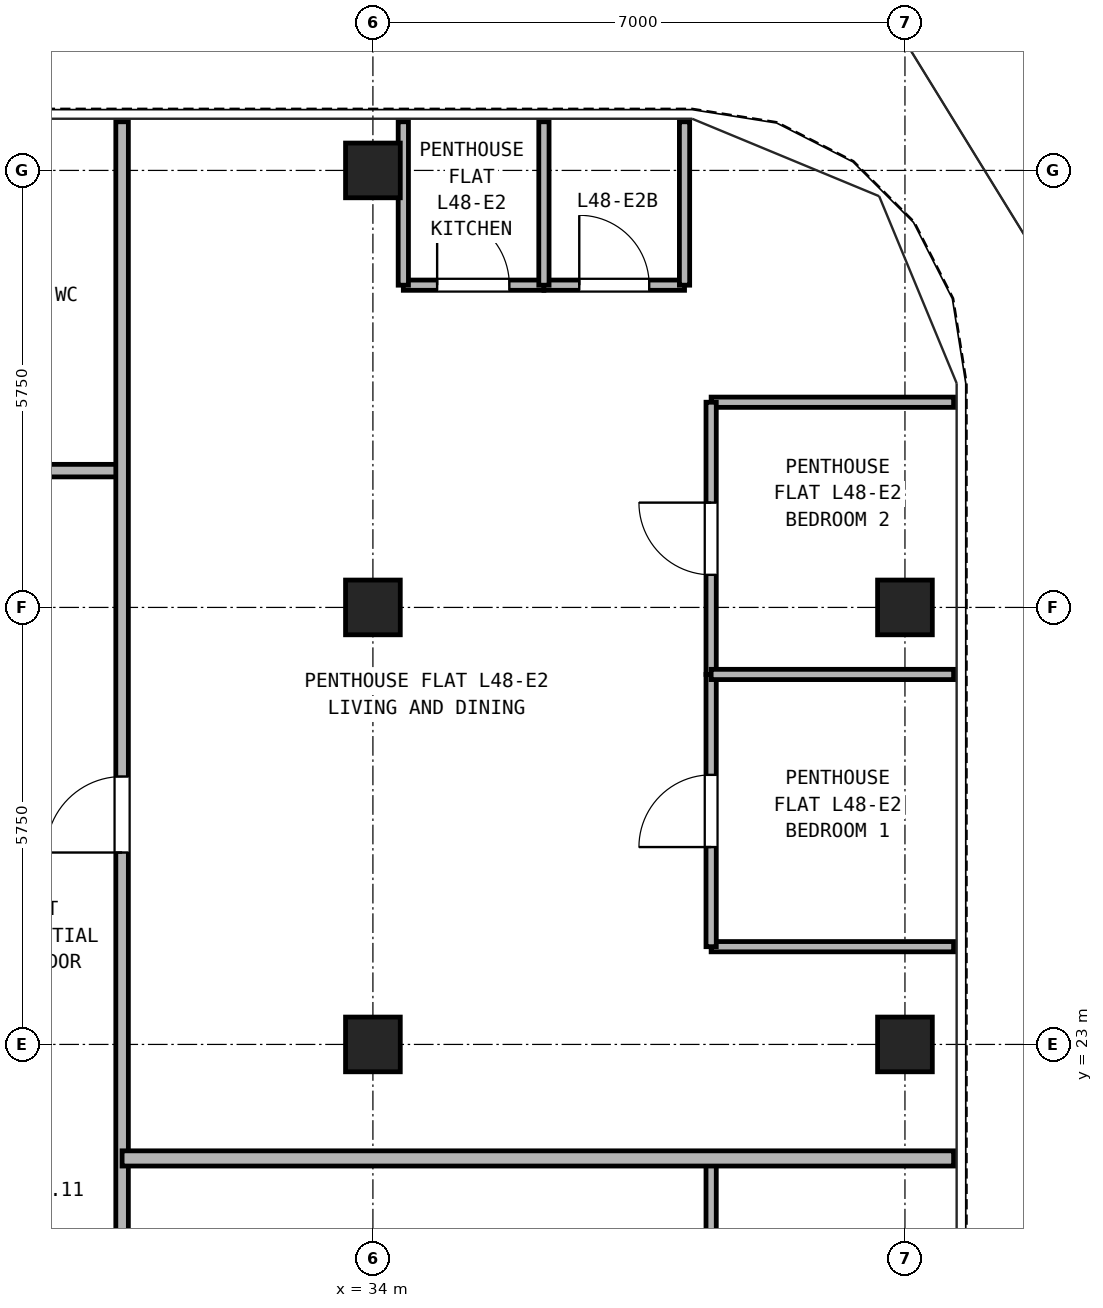
"""IFC4 building model, lengths in metres.
Left out: names, types, materials, properties, quantities, classifications, styles, units other than length and angle.
Written with IfcOpenShell. Run it as: python <this file> out.ifc"""

import sys

from ifc_helpers import new_model, si_unit, direction, frame, frame_2d, origin, origin_2d, place, context, subcontext, project, spatial, rectangle, hollow_rectangle, extrude, source, transform, mapped, element, fill, save


model = new_model("IFC4")
c1 = context("Model", 3, precision=1e-05, world=origin(), true_north=direction((0.0, 1.0)))
c2 = subcontext(c1, "Body", "Model", "MODEL_VIEW")
j1 = project(units=[si_unit("LENGTHUNIT", "METRE"), si_unit("PLANEANGLEUNIT", "RADIAN")], contexts=[c1])
p1 = place(None, origin())
s1 = spatial("IfcSite", under=j1, at=p1, CompositionType="ELEMENT")
p2 = place(p1, origin())
s2 = spatial("IfcBuilding", under=s1, at=p2, CompositionType="ELEMENT")
p3 = place(p2, frame((0.0, 0.0, 172.1)))
s3 = spatial("IfcBuildingStorey", under=s2, at=p3, CompositionType="ELEMENT", Elevation=172.1)
m1 = source(origin(), c2, "Body", "SweptSolid", [
    extrude(hollow_rectangle(XDim=0.72, YDim=0.72, WallThickness=0.04, at=origin_2d()), origin(), (0.0, 0.0, 1.0), 2.95),
])
for number, where, z_axis, x_axis in (
    (1, (34.0, 34.5, 0.0), (0.0, 0.0, 1.0), (1.0, 0.0, 0.0)),
    (2, (41.0, 23.0, 0.0), (0.0, 0.0, 1.0), (1.0, 0.0, 0.0)),
    (3, (41.0, 28.75, 0.0), (0.0, 0.0, 1.0), (1.0, 0.0, 0.0)),
    (4, (34.0, 23.0, 0.0), (0.0, 0.0, 1.0), (1.0, 0.0, 0.0)),
    (5, (34.0, 28.75, 0.0), (0.0, 0.0, 1.0), (1.0, 0.0, 0.0)),
):
    element("IfcColumn", number, at=place(p3, frame(where, z_axis=z_axis, x_axis=x_axis)), inside=s3, PredefinedType="COLUMN", context=c2, shape_type="MappedRepresentation", body=[
        mapped(m1, transform((0.0, 0.0, 0.0), x_axis=(1.0, 0.0, 0.0), y_axis=(0.0, 1.0, 0.0), z_axis=(0.0, 0.0, 1.0), scale=1.0)),
    ])
p4 = place(p3, frame((16.3, 30.55, 0.0), z_axis=(0.0, 0.0, 1.0), x_axis=(1.0, 0.0, 0.0)))
e6 = element("IfcWall", 6, at=p4, inside=s3, PredefinedType="PARTITIONING", context=c2, shape_type="SweptSolid", body=[
    extrude(rectangle(XDim=14.4, YDim=0.165, at=frame_2d((7.2, 0.0))), origin(), (0.0, 0.0, 1.0), 2.95),
])
p5 = place(p4, frame((2.1, 0.0, 0.0)))
e7 = element("IfcOpeningElement", 7, at=p5, cuts=e6, PredefinedType="OPENING", context=c2, shape_type="SweptSolid", body=[
    extrude(rectangle(XDim=0.95, YDim=2.15, at=frame_2d((0.475, 1.075))), frame((0.0, 0.093, 0.0), z_axis=(0.0, -1.0, 0.0), x_axis=(1.0, 0.0, 0.0)), (0.0, 0.0, 1.0), 0.185),
])
p6 = place(p4, frame((6.9, 0.0, 0.0)))
e8 = element("IfcOpeningElement", 8, at=p6, cuts=e6, PredefinedType="OPENING", context=c2, shape_type="SweptSolid", body=[
    extrude(rectangle(XDim=0.95, YDim=2.15, at=frame_2d((0.475, 1.075))), frame((0.0, 0.093, 0.0), z_axis=(0.0, -1.0, 0.0), x_axis=(1.0, 0.0, 0.0)), (0.0, 0.0, 1.0), 0.185),
])
p7 = place(p4, frame((11.5, 0.0, 0.0)))
e9 = element("IfcOpeningElement", 9, at=p7, cuts=e6, PredefinedType="OPENING", context=c2, shape_type="SweptSolid", body=[
    extrude(rectangle(XDim=0.92, YDim=2.1, at=frame_2d((0.46, 1.05))), frame((0.0, 0.093, 0.0), z_axis=(0.0, -1.0, 0.0), x_axis=(1.0, 0.0, 0.0)), (0.0, 0.0, 1.0), 0.185),
])
p8 = place(p3, frame((30.7, 11.45, 0.0), z_axis=(0.0, 0.0, 1.0), x_axis=(0.0, 1.0, 0.0)))
e10 = element("IfcWall", 10, at=p8, inside=s3, PredefinedType="PARTITIONING", context=c2, shape_type="SweptSolid", body=[
    extrude(rectangle(XDim=23.69, YDim=0.165, at=frame_2d((11.845, 0.0))), origin(), (0.0, 0.0, 1.0), 2.95),
])
p9 = place(p8, frame((4.525, 0.0, 0.0)))
e11 = element("IfcOpeningElement", 11, at=p9, cuts=e10, PredefinedType="OPENING", context=c2, shape_type="SweptSolid", body=[
    extrude(rectangle(XDim=1.0, YDim=2.15, at=frame_2d((0.5, 1.075))), frame((0.0, 0.093, 0.0), z_axis=(0.0, -1.0, 0.0), x_axis=(1.0, 0.0, 0.0)), (0.0, 0.0, 1.0), 0.185),
])
p10 = place(p8, frame((14.075, 0.0, 0.0)))
e12 = element("IfcOpeningElement", 12, at=p10, cuts=e10, PredefinedType="OPENING", context=c2, shape_type="SweptSolid", body=[
    extrude(rectangle(XDim=1.0, YDim=2.15, at=frame_2d((0.5, 1.075))), frame((0.0, 0.093, 0.0), z_axis=(0.0, -1.0, 0.0), x_axis=(1.0, 0.0, 0.0)), (0.0, 0.0, 1.0), 0.185),
])
p11 = place(p3, frame((38.45, 18.1, 0.0), z_axis=(0.0, 0.0, 1.0), x_axis=(0.0, 1.0, 0.0)))
e13 = element("IfcWall", 13, at=p11, inside=s3, PredefinedType="PARTITIONING", context=c2, shape_type="SweptSolid", body=[
    extrude(rectangle(XDim=3.4, YDim=0.135, at=frame_2d((1.7, 0.0))), origin(), (0.0, 0.0, 1.0), 2.95),
])
p12 = place(p11, frame((1.22, 0.0, 0.0)))
e14 = element("IfcOpeningElement", 14, at=p12, cuts=e13, PredefinedType="OPENING", context=c2, shape_type="SweptSolid", body=[
    extrude(rectangle(XDim=0.95, YDim=2.15, at=frame_2d((0.475, 1.075))), frame((0.0, 0.077, 0.0), z_axis=(0.0, -1.0, 0.0), x_axis=(1.0, 0.0, 0.0)), (0.0, 0.0, 1.0), 0.155),
])
p13 = place(p3, frame((30.7, 21.5, 0.0), z_axis=(0.0, 0.0, 1.0), x_axis=(1.0, 0.0, 0.0)))
e15 = element("IfcWall", 15, at=p13, inside=s3, PredefinedType="PARTITIONING", context=c2, shape_type="SweptSolid", body=[
    extrude(rectangle(XDim=10.94, YDim=0.2, at=frame_2d((5.47, 0.0))), origin(), (0.0, 0.0, 1.0), 2.95),
])
p14 = place(p3, frame((34.4, 32.99, 0.0), z_axis=(0.0, 0.0, 1.0), x_axis=(1.0, 0.0, 0.0)))
e16 = element("IfcWall", 16, at=p14, inside=s3, PredefinedType="PARTITIONING", context=c2, shape_type="SweptSolid", body=[
    extrude(rectangle(XDim=1.85, YDim=0.135, at=frame_2d((0.925, 0.0))), origin(), (0.0, 0.0, 1.0), 2.95),
])
p15 = place(p14, frame((0.445, 0.0, 0.0)))
e17 = element("IfcOpeningElement", 17, at=p15, cuts=e16, PredefinedType="OPENING", context=c2, shape_type="SweptSolid", body=[
    extrude(rectangle(XDim=0.95, YDim=2.15, at=frame_2d((0.475, 1.075))), frame((0.0, 0.077, 0.0), z_axis=(0.0, -1.0, 0.0), x_axis=(1.0, 0.0, 0.0)), (0.0, 0.0, 1.0), 0.155),
])
p16 = place(p3, frame((36.25, 32.99, 0.0), z_axis=(0.0, 0.0, 1.0), x_axis=(1.0, 0.0, 0.0)))
e18 = element("IfcWall", 18, at=p16, inside=s3, PredefinedType="PARTITIONING", context=c2, shape_type="SweptSolid", body=[
    extrude(rectangle(XDim=1.85, YDim=0.135, at=frame_2d((0.925, 0.0))), origin(), (0.0, 0.0, 1.0), 2.95),
])
p17 = place(p16, frame((0.465, 0.0, 0.0)))
e19 = element("IfcOpeningElement", 19, at=p17, cuts=e18, PredefinedType="OPENING", context=c2, shape_type="SweptSolid", body=[
    extrude(rectangle(XDim=0.92, YDim=2.1, at=frame_2d((0.46, 1.05))), frame((0.0, 0.077, 0.0), z_axis=(0.0, -1.0, 0.0), x_axis=(1.0, 0.0, 0.0)), (0.0, 0.0, 1.0), 0.155),
])
for number, where, z_axis, x_axis in (
    (20, (34.4, 32.99, 0.0), (0.0, 0.0, 1.0), (0.0, 1.0, 0.0)),
    (21, (36.25, 32.99, 0.0), (0.0, 0.0, 1.0), (0.0, 1.0, 0.0)),
    (22, (38.1, 32.99, 0.0), (0.0, 0.0, 1.0), (0.0, 1.0, 0.0)),
):
    element("IfcWall", number, at=place(p3, frame(where, z_axis=z_axis, x_axis=x_axis)), inside=s3, PredefinedType="PARTITIONING", context=c2, shape_type="SweptSolid", body=[
        extrude(rectangle(XDim=2.15, YDim=0.135, at=frame_2d((1.075, 0.0))), origin(), (0.0, 0.0, 1.0), 2.95),
    ])
for number, where, z_axis, x_axis in (
    (23, (38.45, 24.286, 0.0), (0.0, 0.0, 1.0), (1.0, 0.0, 0.0)),
    (24, (38.45, 31.45, 0.0), (0.0, 0.0, 1.0), (1.0, 0.0, 0.0)),
):
    element("IfcWall", number, at=place(p3, frame(where, z_axis=z_axis, x_axis=x_axis)), inside=s3, PredefinedType="PARTITIONING", context=c2, shape_type="SweptSolid", body=[
        extrude(rectangle(XDim=3.19, YDim=0.135, at=frame_2d((1.595, 0.0))), origin(), (0.0, 0.0, 1.0), 2.95),
    ])
p18 = place(p3, frame((38.45, 24.286, 0.0), z_axis=(0.0, 0.0, 1.0), x_axis=(0.0, 1.0, 0.0)))
e25 = element("IfcWall", 25, at=p18, inside=s3, PredefinedType="PARTITIONING", context=c2, shape_type="SweptSolid", body=[
    extrude(rectangle(XDim=3.582, YDim=0.135, at=frame_2d((1.791, 0.0))), origin(), (0.0, 0.0, 1.0), 2.95),
])
p19 = place(p18, frame((1.311, 0.0, 0.0)))
e26 = element("IfcOpeningElement", 26, at=p19, cuts=e25, PredefinedType="OPENING", context=c2, shape_type="SweptSolid", body=[
    extrude(rectangle(XDim=0.95, YDim=2.15, at=frame_2d((0.475, 1.075))), frame((0.0, 0.077, 0.0), z_axis=(0.0, -1.0, 0.0), x_axis=(1.0, 0.0, 0.0)), (0.0, 0.0, 1.0), 0.155),
])
p20 = place(p3, frame((38.45, 27.868, 0.0), z_axis=(0.0, 0.0, 1.0), x_axis=(0.0, 1.0, 0.0)))
e27 = element("IfcWall", 27, at=p20, inside=s3, PredefinedType="PARTITIONING", context=c2, shape_type="SweptSolid", body=[
    extrude(rectangle(XDim=3.582, YDim=0.135, at=frame_2d((1.791, 0.0))), origin(), (0.0, 0.0, 1.0), 2.95),
])
p21 = place(p20, frame((1.311, 0.0, 0.0)))
e28 = element("IfcOpeningElement", 28, at=p21, cuts=e27, PredefinedType="OPENING", context=c2, shape_type="SweptSolid", body=[
    extrude(rectangle(XDim=0.95, YDim=2.15, at=frame_2d((0.475, 1.075))), frame((0.0, 0.077, 0.0), z_axis=(0.0, -1.0, 0.0), x_axis=(1.0, 0.0, 0.0)), (0.0, 0.0, 1.0), 0.155),
])
p22 = place(p3, frame((38.45, 27.868, 0.0), z_axis=(0.0, 0.0, 1.0), x_axis=(1.0, 0.0, 0.0)))
e29 = element("IfcWall", 29, at=p22, inside=s3, PredefinedType="PARTITIONING", context=c2, shape_type="SweptSolid", body=[
    extrude(rectangle(XDim=3.19, YDim=0.135, at=frame_2d((1.595, 0.0))), origin(), (0.0, 0.0, 1.0), 2.95),
])
p23 = place(p15, frame((0.95, 0.0, 0.0), z_axis=(0.0, 0.0, 1.0), x_axis=(-1.0, 0.0, 0.0)))
e30 = element("IfcDoor", 30, at=p23, inside=s3, OperationType="SINGLE_SWING_LEFT", PredefinedType="DOOR", context=c2, shape_type="SweptSolid", body=[
    extrude(rectangle(XDim=0.95, YDim=2.15, at=frame_2d((0.475, 1.075))), frame((0.0, 0.025, 0.0), z_axis=(0.0, -1.0, 0.0), x_axis=(1.0, 0.0, 0.0)), (0.0, 0.0, 1.0), 0.05),
])
fill(e17, e30)
p24 = place(p17, frame((0.92, 0.0, 0.0), z_axis=(0.0, 0.0, 1.0), x_axis=(-1.0, 0.0, 0.0)))
e31 = element("IfcDoor", 31, at=p24, inside=s3, OperationType="SINGLE_SWING_LEFT", PredefinedType="DOOR", context=c2, shape_type="SweptSolid", body=[
    extrude(rectangle(XDim=0.92, YDim=2.1, at=frame_2d((0.46, 1.05))), frame((0.0, 0.025, 0.0), z_axis=(0.0, -1.0, 0.0), x_axis=(1.0, 0.0, 0.0)), (0.0, 0.0, 1.0), 0.05),
])
fill(e19, e31)
p25 = place(p19, frame((0.95, 0.0, 0.0), z_axis=(0.0, 0.0, 1.0), x_axis=(-1.0, 0.0, 0.0)))
e32 = element("IfcDoor", 32, at=p25, inside=s3, OperationType="SINGLE_SWING_LEFT", PredefinedType="DOOR", context=c2, shape_type="SweptSolid", body=[
    extrude(rectangle(XDim=0.95, YDim=2.15, at=frame_2d((0.475, 1.075))), frame((0.0, 0.025, 0.0), z_axis=(0.0, -1.0, 0.0), x_axis=(1.0, 0.0, 0.0)), (0.0, 0.0, 1.0), 0.05),
])
fill(e26, e32)
p26 = place(p21, frame((0.95, 0.0, 0.0), z_axis=(0.0, 0.0, 1.0), x_axis=(-1.0, 0.0, 0.0)))
e33 = element("IfcDoor", 33, at=p26, inside=s3, OperationType="SINGLE_SWING_RIGHT", PredefinedType="DOOR", context=c2, shape_type="SweptSolid", body=[
    extrude(rectangle(XDim=0.95, YDim=2.15, at=frame_2d((0.475, 1.075))), frame((0.0, 0.025, 0.0), z_axis=(0.0, -1.0, 0.0), x_axis=(1.0, 0.0, 0.0)), (0.0, 0.0, 1.0), 0.05),
])
fill(e28, e33)
p27 = place(p10, frame((1.0, 0.0, 0.0), z_axis=(0.0, 0.0, 1.0), x_axis=(-1.0, 0.0, 0.0)))
e34 = element("IfcDoor", 34, at=p27, inside=s3, OperationType="SINGLE_SWING_LEFT", PredefinedType="DOOR", context=c2, shape_type="SweptSolid", body=[
    extrude(rectangle(XDim=1.0, YDim=2.15, at=frame_2d((0.5, 1.075))), frame((0.0, 0.025, 0.0), z_axis=(0.0, -1.0, 0.0), x_axis=(1.0, 0.0, 0.0)), (0.0, 0.0, 1.0), 0.05),
])
fill(e12, e34)
save(model, sys.argv[1])
